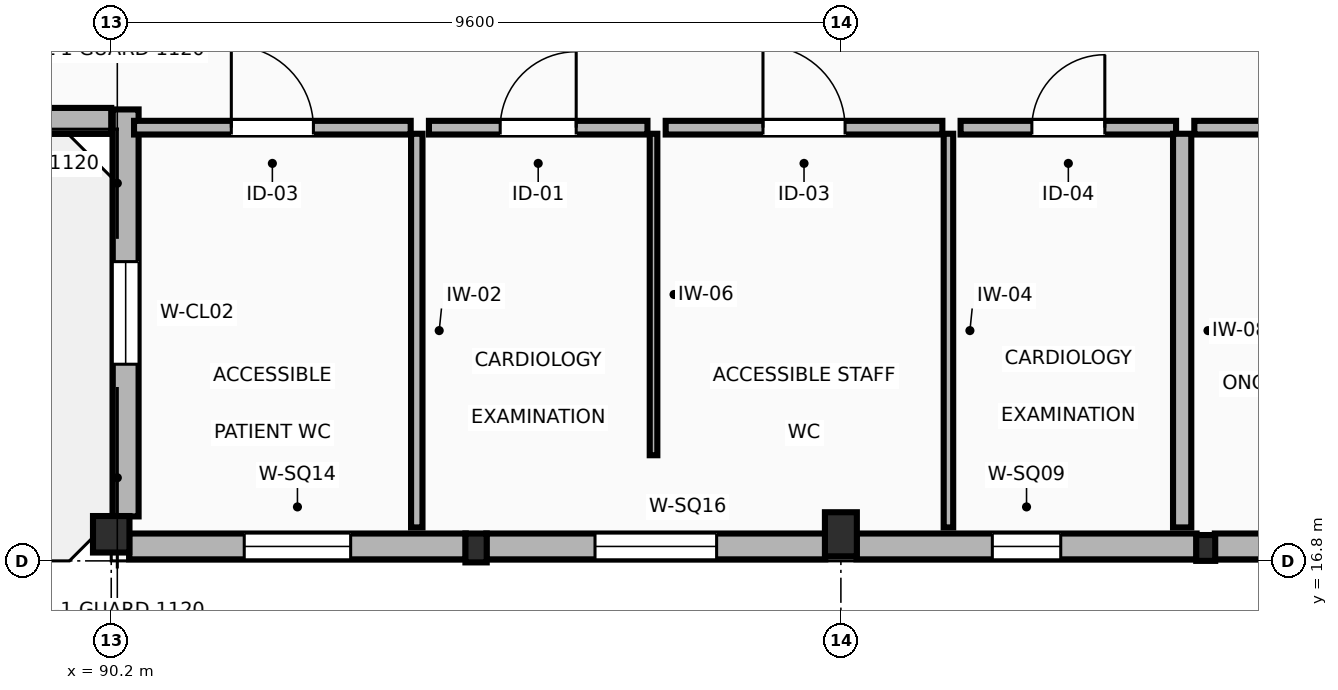
"""IFC4 building model, lengths in metres.
Left out: names, types, materials, properties, quantities, classifications, styles, units other than length and angle.
Written with IfcOpenShell. Run it as: python <this file> out.ifc"""

import sys

from ifc_helpers import new_model, si_unit, direction, frame, frame_2d, origin, origin_2d, place, context, subcontext, project, spatial, rectangle, extrude, element, fill, save


model = new_model("IFC4")
c1 = context("Model", 3, precision=1e-05, world=origin(), true_north=direction((0.0, 1.0)))
c2 = subcontext(c1, "Body", "Model", "MODEL_VIEW")
j1 = project(units=[si_unit("LENGTHUNIT", "METRE"), si_unit("PLANEANGLEUNIT", "RADIAN")], contexts=[c1])
p1 = place(None, origin())
s1 = spatial("IfcSite", under=j1, at=p1, CompositionType="ELEMENT")
p2 = place(p1, origin())
s2 = spatial("IfcBuilding", under=s1, at=p2, CompositionType="ELEMENT")
p3 = place(p2, frame((0.0, 0.0, 9.6)))
s3 = spatial("IfcBuildingStorey", under=s2, at=p3, CompositionType="ELEMENT", Elevation=9.6)
p4 = place(p3, frame((90.2, 17.15, 0.0), z_axis=(0.0, 0.0, 1.0), x_axis=(1.0, 0.0, 0.0)))
e1 = element("IfcColumn", 1, at=p4, inside=s3, PredefinedType="COLUMN", context=c2, shape_type="SweptSolid", body=[
    extrude(rectangle(XDim=0.48, YDim=0.48, at=origin_2d()), origin(), (0.0, 0.0, 1.0), 4.2),
])
p5 = place(p3, frame((99.8, 17.15, 0.0), z_axis=(0.0, 0.0, 1.0), x_axis=(1.0, 0.0, 0.0)))
e2 = element("IfcColumn", 2, at=p5, inside=s3, PredefinedType="COLUMN", context=c2, shape_type="SweptSolid", body=[
    extrude(rectangle(XDim=0.42, YDim=0.58, at=origin_2d()), origin(), (0.0, 0.0, 1.0), 4.2),
])
p6 = place(p3, frame((95.0, 16.97, 0.0), z_axis=(0.0, 0.0, 1.0), x_axis=(1.0, 0.0, 0.0)))
e3 = element("IfcColumn", 3, at=p6, inside=s3, PredefinedType="PILASTER", context=c2, shape_type="SweptSolid", body=[
    extrude(rectangle(XDim=0.28, YDim=0.38, at=origin_2d()), origin(), (0.0, 0.0, 1.0), 4.2),
])
p7 = place(p3, frame((104.6, 16.97, 0.0), z_axis=(0.0, 0.0, 1.0), x_axis=(1.0, 0.0, 0.0)))
e4 = element("IfcColumn", 4, at=p7, inside=s3, PredefinedType="PILASTER", context=c2, shape_type="SweptSolid", body=[
    extrude(rectangle(XDim=0.25, YDim=0.34, at=origin_2d()), origin(), (0.0, 0.0, 1.0), 4.2),
])
p8 = place(p3, frame((80.6, 22.59, 0.0), z_axis=(0.0, 0.0, 1.0), x_axis=(1.0, 0.0, 0.0)))
e5 = element("IfcWall", 5, at=p8, inside=s3, PredefinedType="STANDARD", context=c2, shape_type="SweptSolid", body=[
    extrude(rectangle(XDim=9.6, YDim=0.34, at=frame_2d((4.8, 0.0))), origin(), (0.0, 0.0, 1.0), 3.92),
])
p9 = place(p8, frame((2.105, 0.0, 0.95)))
e6 = element("IfcOpeningElement", 6, at=p9, cuts=e5, PredefinedType="OPENING", context=c2, shape_type="SweptSolid", body=[
    extrude(rectangle(XDim=1.55, YDim=1.45, at=frame_2d((0.775, 0.725))), frame((0.0, 0.18, 0.0), z_axis=(0.0, -1.0, 0.0), x_axis=(1.0, 0.0, 0.0)), (0.0, 0.0, 1.0), 0.36),
])
p10 = place(p8, frame((5.945, 0.0, 0.95)))
e7 = element("IfcOpeningElement", 7, at=p10, cuts=e5, PredefinedType="OPENING", context=c2, shape_type="SweptSolid", body=[
    extrude(rectangle(XDim=1.55, YDim=1.45, at=frame_2d((0.775, 0.725))), frame((0.0, 0.18, 0.0), z_axis=(0.0, -1.0, 0.0), x_axis=(1.0, 0.0, 0.0)), (0.0, 0.0, 1.0), 0.36),
])
p11 = place(p3, frame((90.39, 22.74, 0.0), z_axis=(0.0, 0.0, 1.0), x_axis=(0.0, -1.0, 0.0)))
e8 = element("IfcWall", 8, at=p11, inside=s3, PredefinedType="STANDARD", context=c2, shape_type="SweptSolid", body=[
    extrude(rectangle(XDim=5.355, YDim=0.34, at=frame_2d((2.677, 0.0))), origin(), (0.0, 0.0, 1.0), 3.405),
])
p12 = place(p11, frame((2.002, 0.0, 0.95)))
e9 = element("IfcOpeningElement", 9, at=p12, cuts=e8, PredefinedType="OPENING", context=c2, shape_type="SweptSolid", body=[
    extrude(rectangle(XDim=1.35, YDim=1.6, at=frame_2d((0.675, 0.8))), frame((0.0, 0.18, 0.0), z_axis=(0.0, -1.0, 0.0), x_axis=(1.0, 0.0, 0.0)), (0.0, 0.0, 1.0), 0.36),
])
p13 = place(p3, frame((90.435, 16.99, 0.0), z_axis=(0.0, 0.0, 1.0), x_axis=(1.0, 0.0, 0.0)))
e10 = element("IfcWall", 10, at=p13, inside=s3, PredefinedType="STANDARD", context=c2, shape_type="SweptSolid", body=[
    extrude(rectangle(XDim=4.43, YDim=0.34, at=frame_2d((2.215, 0.0))), origin(), (0.0, 0.0, 1.0), 3.185),
])
p14 = place(p13, frame((1.515, 0.0, 1.15)))
e11 = element("IfcOpeningElement", 11, at=p14, cuts=e10, PredefinedType="OPENING", context=c2, shape_type="SweptSolid", body=[
    extrude(rectangle(XDim=1.4, YDim=1.4, at=frame_2d((0.7, 0.7))), frame((0.0, 0.18, 0.0), z_axis=(0.0, -1.0, 0.0), x_axis=(1.0, 0.0, 0.0)), (0.0, 0.0, 1.0), 0.36),
])
p15 = place(p3, frame((95.135, 16.99, 0.0), z_axis=(0.0, 0.0, 1.0), x_axis=(1.0, 0.0, 0.0)))
e12 = element("IfcWall", 12, at=p15, inside=s3, PredefinedType="STANDARD", context=c2, shape_type="SweptSolid", body=[
    extrude(rectangle(XDim=4.46, YDim=0.34, at=frame_2d((2.23, 0.0))), origin(), (0.0, 0.0, 1.0), 3.185),
])
p16 = place(p15, frame((1.43, 0.0, 1.15)))
e13 = element("IfcOpeningElement", 13, at=p16, cuts=e12, PredefinedType="OPENING", context=c2, shape_type="SweptSolid", body=[
    extrude(rectangle(XDim=1.6, YDim=1.6, at=frame_2d((0.8, 0.8))), frame((0.0, 0.18, 0.0), z_axis=(0.0, -1.0, 0.0), x_axis=(1.0, 0.0, 0.0)), (0.0, 0.0, 1.0), 0.36),
])
p17 = place(p3, frame((100.005, 16.99, 0.0), z_axis=(0.0, 0.0, 1.0), x_axis=(1.0, 0.0, 0.0)))
e14 = element("IfcWall", 14, at=p17, inside=s3, PredefinedType="STANDARD", context=c2, shape_type="SweptSolid", body=[
    extrude(rectangle(XDim=4.475, YDim=0.34, at=frame_2d((2.238, 0.0))), origin(), (0.0, 0.0, 1.0), 3.185),
])
p18 = place(p17, frame((1.788, 0.0, 1.35)))
e15 = element("IfcOpeningElement", 15, at=p18, cuts=e14, PredefinedType="OPENING", context=c2, shape_type="SweptSolid", body=[
    extrude(rectangle(XDim=0.9, YDim=0.9, at=frame_2d((0.45, 0.45))), frame((0.0, 0.18, 0.0), z_axis=(0.0, -1.0, 0.0), x_axis=(1.0, 0.0, 0.0)), (0.0, 0.0, 1.0), 0.36),
])
p19 = place(p3, frame((104.72, 16.99, 0.0), z_axis=(0.0, 0.0, 1.0), x_axis=(1.0, 0.0, 0.0)))
e16 = element("IfcWall", 16, at=p19, inside=s3, PredefinedType="STANDARD", context=c2, shape_type="SweptSolid", body=[
    extrude(rectangle(XDim=4.5, YDim=0.34, at=frame_2d((2.25, 0.0))), origin(), (0.0, 0.0, 1.0), 3.185),
])
p20 = place(p19, frame((1.7, 0.0, 1.35)))
e17 = element("IfcOpeningElement", 17, at=p20, cuts=e16, PredefinedType="OPENING", context=c2, shape_type="SweptSolid", body=[
    extrude(rectangle(XDim=1.1, YDim=1.1, at=frame_2d((0.55, 0.55))), frame((0.0, 0.18, 0.0), z_axis=(0.0, -1.0, 0.0), x_axis=(1.0, 0.0, 0.0)), (0.0, 0.0, 1.0), 0.36),
])
p21 = place(p3, frame((94.22, 22.42, 0.0), z_axis=(0.0, 0.0, 1.0), x_axis=(0.0, -1.0, 0.0)))
e18 = element("IfcWall", 18, at=p21, inside=s3, PredefinedType="PARTITIONING", context=c2, shape_type="SweptSolid", body=[
    extrude(rectangle(XDim=5.18, YDim=0.15, at=frame_2d((2.59, 0.0))), origin(), (0.0, 0.0, 1.0), 3.92),
])
p22 = place(p3, frame((90.5, 22.5, 0.0), z_axis=(0.0, 0.0, 1.0), x_axis=(1.0, 0.0, 0.0)))
e19 = element("IfcWall", 19, at=p22, inside=s3, PredefinedType="PARTITIONING", context=c2, shape_type="SweptSolid", body=[
    extrude(rectangle(XDim=3.64, YDim=0.18, at=frame_2d((1.82, 0.0))), origin(), (0.0, 0.0, 1.0), 3.92),
])
p23 = place(p22, frame((1.28, 0.0, 0.0)))
e20 = element("IfcOpeningElement", 20, at=p23, cuts=e19, PredefinedType="OPENING", context=c2, shape_type="SweptSolid", body=[
    extrude(rectangle(XDim=1.08, YDim=2.2, at=frame_2d((0.54, 1.1))), frame((0.0, 0.1, 0.0), z_axis=(0.0, -1.0, 0.0), x_axis=(1.0, 0.0, 0.0)), (0.0, 0.0, 1.0), 0.2),
])
p24 = place(p3, frame((94.38, 22.5, 0.0), z_axis=(0.0, 0.0, 1.0), x_axis=(1.0, 0.0, 0.0)))
e21 = element("IfcWall", 21, at=p24, inside=s3, PredefinedType="PARTITIONING", context=c2, shape_type="SweptSolid", body=[
    extrude(rectangle(XDim=2.875, YDim=0.18, at=frame_2d((1.438, 0.0))), origin(), (0.0, 0.0, 1.0), 3.92),
])
p25 = place(p24, frame((0.938, 0.0, 0.0)))
e22 = element("IfcOpeningElement", 22, at=p25, cuts=e21, PredefinedType="OPENING", context=c2, shape_type="SweptSolid", body=[
    extrude(rectangle(XDim=1.0, YDim=2.15, at=frame_2d((0.5, 1.075))), frame((0.0, 0.1, 0.0), z_axis=(0.0, -1.0, 0.0), x_axis=(1.0, 0.0, 0.0)), (0.0, 0.0, 1.0), 0.2),
])
p26 = place(p3, frame((97.335, 22.42, 0.0), z_axis=(0.0, 0.0, 1.0), x_axis=(0.0, -1.0, 0.0)))
e23 = element("IfcWall", 23, at=p26, inside=s3, PredefinedType="PARTITIONING", context=c2, shape_type="SweptSolid", body=[
    extrude(rectangle(XDim=4.23, YDim=0.1, at=frame_2d((2.115, 0.0))), origin(), (0.0, 0.0, 1.0), 3.92),
])
p27 = place(p3, frame((101.215, 22.42, 0.0), z_axis=(0.0, 0.0, 1.0), x_axis=(0.0, -1.0, 0.0)))
e24 = element("IfcWall", 24, at=p27, inside=s3, PredefinedType="PARTITIONING", context=c2, shape_type="SweptSolid", body=[
    extrude(rectangle(XDim=5.18, YDim=0.125, at=frame_2d((2.59, 0.0))), origin(), (0.0, 0.0, 1.0), 3.92),
])
p28 = place(p3, frame((97.495, 22.5, 0.0), z_axis=(0.0, 0.0, 1.0), x_axis=(1.0, 0.0, 0.0)))
e25 = element("IfcWall", 25, at=p28, inside=s3, PredefinedType="PARTITIONING", context=c2, shape_type="SweptSolid", body=[
    extrude(rectangle(XDim=3.64, YDim=0.18, at=frame_2d((1.82, 0.0))), origin(), (0.0, 0.0, 1.0), 3.92),
])
p29 = place(p28, frame((1.28, 0.0, 0.0)))
e26 = element("IfcOpeningElement", 26, at=p29, cuts=e25, PredefinedType="OPENING", context=c2, shape_type="SweptSolid", body=[
    extrude(rectangle(XDim=1.08, YDim=2.2, at=frame_2d((0.54, 1.1))), frame((0.0, 0.1, 0.0), z_axis=(0.0, -1.0, 0.0), x_axis=(1.0, 0.0, 0.0)), (0.0, 0.0, 1.0), 0.2),
])
p30 = place(p3, frame((101.375, 22.5, 0.0), z_axis=(0.0, 0.0, 1.0), x_axis=(1.0, 0.0, 0.0)))
e27 = element("IfcWall", 27, at=p30, inside=s3, PredefinedType="PARTITIONING", context=c2, shape_type="SweptSolid", body=[
    extrude(rectangle(XDim=2.835, YDim=0.18, at=frame_2d((1.417, 0.0))), origin(), (0.0, 0.0, 1.0), 3.92),
])
p31 = place(p30, frame((0.938, 0.0, 0.0)))
e28 = element("IfcOpeningElement", 28, at=p31, cuts=e27, PredefinedType="OPENING", context=c2, shape_type="SweptSolid", body=[
    extrude(rectangle(XDim=0.96, YDim=2.1, at=frame_2d((0.48, 1.05))), frame((0.0, 0.1, 0.0), z_axis=(0.0, -1.0, 0.0), x_axis=(1.0, 0.0, 0.0)), (0.0, 0.0, 1.0), 0.2),
])
p32 = place(p3, frame((104.29, 22.42, 0.0), z_axis=(0.0, 0.0, 1.0), x_axis=(0.0, -1.0, 0.0)))
e29 = element("IfcWall", 29, at=p32, inside=s3, PredefinedType="PARTITIONING", context=c2, shape_type="SweptSolid", body=[
    extrude(rectangle(XDim=5.18, YDim=0.24, at=frame_2d((2.59, 0.0))), origin(), (0.0, 0.0, 1.0), 3.92),
])
p33 = place(p3, frame((104.45, 22.5, 0.0), z_axis=(0.0, 0.0, 1.0), x_axis=(1.0, 0.0, 0.0)))
e30 = element("IfcWall", 30, at=p33, inside=s3, PredefinedType="PARTITIONING", context=c2, shape_type="SweptSolid", body=[
    extrude(rectangle(XDim=6.715, YDim=0.18, at=frame_2d((3.357, 0.0))), origin(), (0.0, 0.0, 1.0), 3.92),
])
p34 = place(p33, frame((2.718, 0.0, 0.0)))
e31 = element("IfcOpeningElement", 31, at=p34, cuts=e30, PredefinedType="OPENING", context=c2, shape_type="SweptSolid", body=[
    extrude(rectangle(XDim=1.28, YDim=2.25, at=frame_2d((0.64, 1.125))), frame((0.0, 0.1, 0.0), z_axis=(0.0, -1.0, 0.0), x_axis=(1.0, 0.0, 0.0)), (0.0, 0.0, 1.0), 0.2),
])
p35 = place(p12, origin())
e32 = element("IfcWindow", 32, at=p35, inside=s3, PartitioningType="SINGLE_PANEL", PredefinedType="WINDOW", context=c2, shape_type="SweptSolid", body=[
    extrude(rectangle(XDim=1.35, YDim=1.6, at=frame_2d((0.675, 0.8))), frame((0.0, 0.03, 0.0), z_axis=(0.0, -1.0, 0.0), x_axis=(1.0, 0.0, 0.0)), (0.0, 0.0, 1.0), 0.06),
])
fill(e9, e32)
p36 = place(p14, origin())
e33 = element("IfcWindow", 33, at=p36, inside=s3, PartitioningType="SINGLE_PANEL", PredefinedType="WINDOW", context=c2, shape_type="SweptSolid", body=[
    extrude(rectangle(XDim=1.4, YDim=1.4, at=frame_2d((0.7, 0.7))), frame((0.0, 0.03, 0.0), z_axis=(0.0, -1.0, 0.0), x_axis=(1.0, 0.0, 0.0)), (0.0, 0.0, 1.0), 0.06),
])
fill(e11, e33)
p37 = place(p16, origin())
e34 = element("IfcWindow", 34, at=p37, inside=s3, PartitioningType="SINGLE_PANEL", PredefinedType="WINDOW", context=c2, shape_type="SweptSolid", body=[
    extrude(rectangle(XDim=1.6, YDim=1.6, at=frame_2d((0.8, 0.8))), frame((0.0, 0.03, 0.0), z_axis=(0.0, -1.0, 0.0), x_axis=(1.0, 0.0, 0.0)), (0.0, 0.0, 1.0), 0.06),
])
fill(e13, e34)
p38 = place(p18, origin())
e35 = element("IfcWindow", 35, at=p38, inside=s3, PartitioningType="SINGLE_PANEL", PredefinedType="WINDOW", context=c2, shape_type="SweptSolid", body=[
    extrude(rectangle(XDim=0.9, YDim=0.9, at=frame_2d((0.45, 0.45))), frame((0.0, 0.03, 0.0), z_axis=(0.0, -1.0, 0.0), x_axis=(1.0, 0.0, 0.0)), (0.0, 0.0, 1.0), 0.06),
])
fill(e15, e35)
p39 = place(p23, origin())
e36 = element("IfcDoor", 36, at=p39, inside=s3, OperationType="SINGLE_SWING_LEFT", PredefinedType="DOOR", context=c2, shape_type="SweptSolid", body=[
    extrude(rectangle(XDim=1.08, YDim=2.2, at=frame_2d((0.54, 1.1))), frame((0.0, 0.025, 0.0), z_axis=(0.0, -1.0, 0.0), x_axis=(1.0, 0.0, 0.0)), (0.0, 0.0, 1.0), 0.05),
])
fill(e20, e36)
p40 = place(p25, origin())
e37 = element("IfcDoor", 37, at=p40, inside=s3, OperationType="SINGLE_SWING_RIGHT", PredefinedType="DOOR", context=c2, shape_type="SweptSolid", body=[
    extrude(rectangle(XDim=1.0, YDim=2.15, at=frame_2d((0.5, 1.075))), frame((0.0, 0.025, 0.0), z_axis=(0.0, -1.0, 0.0), x_axis=(1.0, 0.0, 0.0)), (0.0, 0.0, 1.0), 0.05),
])
fill(e22, e37)
p41 = place(p29, origin())
e38 = element("IfcDoor", 38, at=p41, inside=s3, OperationType="SINGLE_SWING_LEFT", PredefinedType="DOOR", context=c2, shape_type="SweptSolid", body=[
    extrude(rectangle(XDim=1.08, YDim=2.2, at=frame_2d((0.54, 1.1))), frame((0.0, 0.025, 0.0), z_axis=(0.0, -1.0, 0.0), x_axis=(1.0, 0.0, 0.0)), (0.0, 0.0, 1.0), 0.05),
])
fill(e26, e38)
p42 = place(p31, origin())
e39 = element("IfcDoor", 39, at=p42, inside=s3, OperationType="SINGLE_SWING_RIGHT", PredefinedType="DOOR", context=c2, shape_type="SweptSolid", body=[
    extrude(rectangle(XDim=0.96, YDim=2.1, at=frame_2d((0.48, 1.05))), frame((0.0, 0.025, 0.0), z_axis=(0.0, -1.0, 0.0), x_axis=(1.0, 0.0, 0.0)), (0.0, 0.0, 1.0), 0.05),
])
fill(e28, e39)
save(model, sys.argv[1])
